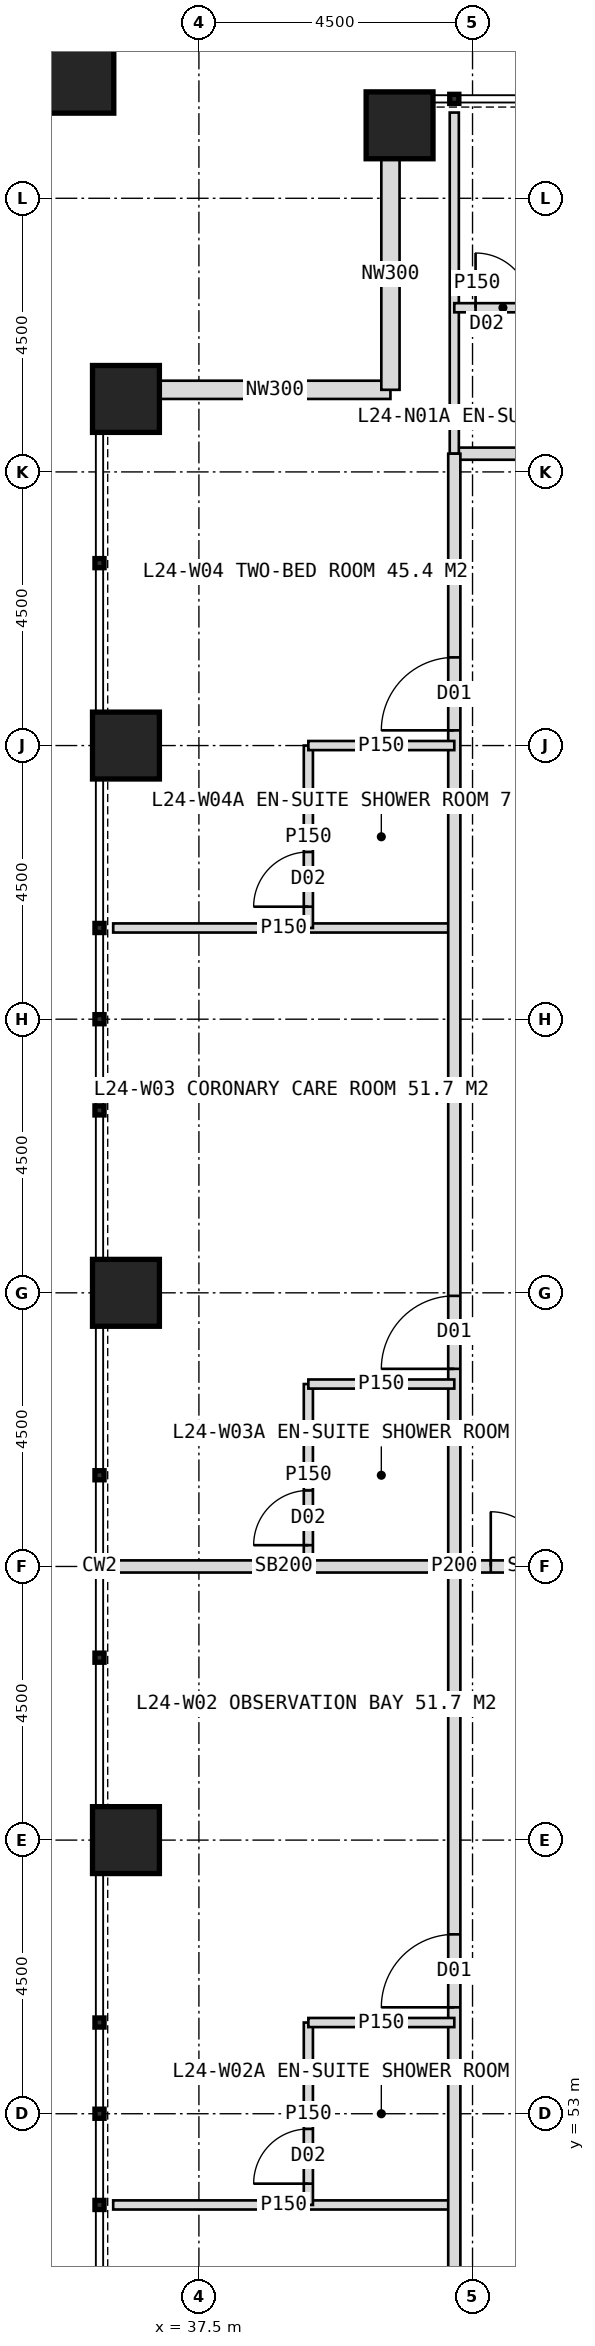
"""IFC4 building model, lengths in metres.
Left out: names, types, materials, properties, quantities, classifications, styles, units other than length and angle.
Written with IfcOpenShell. Run it as: python <this file> out.ifc"""

import sys

from ifc_helpers import new_model, si_unit, direction, frame, frame_2d, origin, origin_2d, place, context, subcontext, project, spatial, rectangle, hollow_rectangle, extrude, element, fill, save


model = new_model("IFC4")
c1 = context("Model", 3, precision=1e-05, world=origin(), true_north=direction((0.0, 1.0)))
c2 = subcontext(c1, "Body", "Model", "MODEL_VIEW")
j1 = project(units=[si_unit("LENGTHUNIT", "METRE"), si_unit("PLANEANGLEUNIT", "RADIAN")], contexts=[c1])
p1 = place(None, origin())
s1 = spatial("IfcSite", under=j1, at=p1, CompositionType="ELEMENT")
p2 = place(p1, origin())
s2 = spatial("IfcBuilding", under=s1, at=p2, CompositionType="ELEMENT")
p3 = place(p2, frame((0.0, 0.0, 104.0)))
s3 = spatial("IfcBuildingStorey", under=s2, at=p3, CompositionType="ELEMENT", Elevation=104.0)
for number, where, z_axis, x_axis in (
    (1, (40.8, 85.7, 0.0), (0.0, 0.0, 1.0), (1.0, 0.0, 0.0)),
    (2, (36.3, 57.5, 0.0), (0.0, 0.0, 1.0), (1.0, 0.0, 0.0)),
    (3, (36.3, 66.5, 0.0), (0.0, 0.0, 1.0), (1.0, 0.0, 0.0)),
    (4, (36.3, 75.5, 0.0), (0.0, 0.0, 1.0), (1.0, 0.0, 0.0)),
    (5, (36.3, 81.2, 0.0), (0.0, 0.0, 1.0), (1.0, 0.0, 0.0)),
):
    element("IfcColumn", number, at=place(p3, frame(where, z_axis=z_axis, x_axis=x_axis)), inside=s3, PredefinedType="COLUMN", context=c2, shape_type="SweptSolid", body=[
        extrude(hollow_rectangle(XDim=1.1, YDim=1.1, WallThickness=0.1, at=origin_2d()), origin(), (0.0, 0.0, 1.0), 4.0),
    ])
p4 = place(p3, frame((35.4, 86.6, 0.0), z_axis=(0.0, 0.0, 1.0), x_axis=(1.0, 0.0, 0.0)))
e6 = element("IfcColumn", 6, at=p4, inside=s3, PredefinedType="COLUMN", context=c2, shape_type="SweptSolid", body=[
    extrude(hollow_rectangle(XDim=1.4, YDim=1.4, WallThickness=0.08, at=origin_2d()), origin(), (0.0, 0.0, 1.0), 4.0),
])
for number, where, z_axis, x_axis in (
    (7, (36.85, 81.35, 0.0), (0.0, 0.0, 1.0), (1.0, 0.0, 0.0)),
    (8, (40.65, 81.35, 0.0), (0.0, 0.0, 1.0), (0.0, 1.0, 0.0)),
):
    element("IfcWall", number, at=place(p3, frame(where, z_axis=z_axis, x_axis=x_axis)), inside=s3, PredefinedType="ELEMENTEDWALL", context=c2, shape_type="SweptSolid", body=[
        extrude(rectangle(XDim=3.8, YDim=0.3, at=frame_2d((1.9, 0.0))), origin(), (0.0, 0.0, 1.0), 4.0),
    ])
p5 = place(p3, frame((41.7, 80.3, 0.0), z_axis=(0.0, 0.0, 1.0), x_axis=(1.0, 0.0, 0.0)))
e9 = element("IfcWall", 9, at=p5, inside=s3, PredefinedType="PARTITIONING", context=c2, shape_type="SweptSolid", body=[
    extrude(rectangle(XDim=36.6, YDim=0.2, at=frame_2d((18.3, 0.0))), origin(), (0.0, 0.0, 1.0), 3.75),
])
p6 = place(p5, frame((3.25, 0.0, 0.0)))
e10 = element("IfcOpeningElement", 10, at=p6, cuts=e9, PredefinedType="OPENING", context=c2, shape_type="SweptSolid", body=[
    extrude(rectangle(XDim=1.2, YDim=2.2, at=frame_2d((0.6, 1.1))), frame((0.0, 0.11, 0.0), z_axis=(0.0, -1.0, 0.0), x_axis=(1.0, 0.0, 0.0)), (0.0, 0.0, 1.0), 0.22),
])
p7 = place(p5, frame((11.05, 0.0, 0.0)))
e11 = element("IfcOpeningElement", 11, at=p7, cuts=e9, PredefinedType="OPENING", context=c2, shape_type="SweptSolid", body=[
    extrude(rectangle(XDim=1.2, YDim=2.2, at=frame_2d((0.6, 1.1))), frame((0.0, 0.11, 0.0), z_axis=(0.0, -1.0, 0.0), x_axis=(1.0, 0.0, 0.0)), (0.0, 0.0, 1.0), 0.22),
])
p8 = place(p5, frame((20.05, 0.0, 0.0)))
e12 = element("IfcOpeningElement", 12, at=p8, cuts=e9, PredefinedType="OPENING", context=c2, shape_type="SweptSolid", body=[
    extrude(rectangle(XDim=1.2, YDim=2.2, at=frame_2d((0.6, 1.1))), frame((0.0, 0.11, 0.0), z_axis=(0.0, -1.0, 0.0), x_axis=(1.0, 0.0, 0.0)), (0.0, 0.0, 1.0), 0.22),
])
p9 = place(p5, frame((28.45, 0.0, 0.0)))
e13 = element("IfcOpeningElement", 13, at=p9, cuts=e9, PredefinedType="OPENING", context=c2, shape_type="SweptSolid", body=[
    extrude(rectangle(XDim=1.2, YDim=2.2, at=frame_2d((0.6, 1.1))), frame((0.0, 0.11, 0.0), z_axis=(0.0, -1.0, 0.0), x_axis=(1.0, 0.0, 0.0)), (0.0, 0.0, 1.0), 0.22),
])
p10 = place(p3, frame((41.7, 80.3, 0.0), z_axis=(0.0, 0.0, 1.0), x_axis=(0.0, 1.0, 0.0)))
e14 = element("IfcWall", 14, at=p10, inside=s3, PredefinedType="PARTITIONING", context=c2, shape_type="SweptSolid", body=[
    extrude(rectangle(XDim=5.61, YDim=0.15, at=frame_2d((2.805, 0.0))), origin(), (0.0, 0.0, 1.0), 3.75),
])
p11 = place(p3, frame((41.7, 82.7, 0.0), z_axis=(0.0, 0.0, 1.0), x_axis=(1.0, 0.0, 0.0)))
e15 = element("IfcWall", 15, at=p11, inside=s3, PredefinedType="PARTITIONING", context=c2, shape_type="SweptSolid", body=[
    extrude(rectangle(XDim=3.0, YDim=0.15, at=frame_2d((1.5, 0.0))), origin(), (0.0, 0.0, 1.0), 3.75),
])
p12 = place(p11, frame((0.35, 0.0, 0.0)))
e16 = element("IfcOpeningElement", 16, at=p12, cuts=e15, PredefinedType="OPENING", context=c2, shape_type="SweptSolid", body=[
    extrude(rectangle(XDim=0.9, YDim=2.1, at=frame_2d((0.45, 1.05))), frame((0.0, 0.085, 0.0), z_axis=(0.0, -1.0, 0.0), x_axis=(1.0, 0.0, 0.0)), (0.0, 0.0, 1.0), 0.17),
])
p13 = place(p3, frame((41.7, 51.5, 0.0), z_axis=(0.0, 0.0, 1.0), x_axis=(-1.0, 0.0, 0.0)))
e17 = element("IfcWall", 17, at=p13, inside=s3, PredefinedType="PARTITIONING", context=c2, shape_type="SweptSolid", body=[
    extrude(rectangle(XDim=5.61, YDim=0.15, at=frame_2d((2.805, 0.0))), origin(), (0.0, 0.0, 1.0), 3.75),
])
p14 = place(p3, frame((41.7, 62.0, 0.0), z_axis=(0.0, 0.0, 1.0), x_axis=(-1.0, 0.0, 0.0)))
e18 = element("IfcWall", 18, at=p14, inside=s3, PredefinedType="SOLIDWALL", context=c2, shape_type="SweptSolid", body=[
    extrude(rectangle(XDim=5.61, YDim=0.2, at=frame_2d((2.805, 0.0))), origin(), (0.0, 0.0, 1.0), 2.95),
])
p15 = place(p3, frame((41.7, 72.5, 0.0), z_axis=(0.0, 0.0, 1.0), x_axis=(-1.0, 0.0, 0.0)))
e19 = element("IfcWall", 19, at=p15, inside=s3, PredefinedType="PARTITIONING", context=c2, shape_type="SweptSolid", body=[
    extrude(rectangle(XDim=5.61, YDim=0.15, at=frame_2d((2.805, 0.0))), origin(), (0.0, 0.0, 1.0), 3.75),
])
p16 = place(p3, frame((41.7, 43.7, 0.0), z_axis=(0.0, 0.0, 1.0), x_axis=(0.0, 1.0, 0.0)))
e20 = element("IfcWall", 20, at=p16, inside=s3, PredefinedType="PARTITIONING", context=c2, shape_type="SweptSolid", body=[
    extrude(rectangle(XDim=36.6, YDim=0.2, at=frame_2d((18.3, 0.0))), origin(), (0.0, 0.0, 1.0), 3.75),
])
p17 = place(p16, frame((3.25, 0.0, 0.0)))
e21 = element("IfcOpeningElement", 21, at=p17, cuts=e20, PredefinedType="OPENING", context=c2, shape_type="SweptSolid", body=[
    extrude(rectangle(XDim=1.2, YDim=2.2, at=frame_2d((0.6, 1.1))), frame((0.0, 0.11, 0.0), z_axis=(0.0, -1.0, 0.0), x_axis=(1.0, 0.0, 0.0)), (0.0, 0.0, 1.0), 0.22),
])
p18 = place(p16, frame((11.05, 0.0, 0.0)))
e22 = element("IfcOpeningElement", 22, at=p18, cuts=e20, PredefinedType="OPENING", context=c2, shape_type="SweptSolid", body=[
    extrude(rectangle(XDim=1.2, YDim=2.2, at=frame_2d((0.6, 1.1))), frame((0.0, 0.11, 0.0), z_axis=(0.0, -1.0, 0.0), x_axis=(1.0, 0.0, 0.0)), (0.0, 0.0, 1.0), 0.22),
])
p19 = place(p16, frame((21.55, 0.0, 0.0)))
e23 = element("IfcOpeningElement", 23, at=p19, cuts=e20, PredefinedType="OPENING", context=c2, shape_type="SweptSolid", body=[
    extrude(rectangle(XDim=1.2, YDim=2.2, at=frame_2d((0.6, 1.1))), frame((0.0, 0.11, 0.0), z_axis=(0.0, -1.0, 0.0), x_axis=(1.0, 0.0, 0.0)), (0.0, 0.0, 1.0), 0.22),
])
p20 = place(p16, frame((32.05, 0.0, 0.0)))
e24 = element("IfcOpeningElement", 24, at=p20, cuts=e20, PredefinedType="OPENING", context=c2, shape_type="SweptSolid", body=[
    extrude(rectangle(XDim=1.2, YDim=2.2, at=frame_2d((0.6, 1.1))), frame((0.0, 0.11, 0.0), z_axis=(0.0, -1.0, 0.0), x_axis=(1.0, 0.0, 0.0)), (0.0, 0.0, 1.0), 0.22),
])
p21 = place(p3, frame((39.3, 51.5, 0.0), z_axis=(0.0, 0.0, 1.0), x_axis=(0.0, 1.0, 0.0)))
e25 = element("IfcWall", 25, at=p21, inside=s3, PredefinedType="PARTITIONING", context=c2, shape_type="SweptSolid", body=[
    extrude(rectangle(XDim=3.0, YDim=0.15, at=frame_2d((1.5, 0.0))), origin(), (0.0, 0.0, 1.0), 3.75),
])
p22 = place(p21, frame((0.35, 0.0, 0.0)))
e26 = element("IfcOpeningElement", 26, at=p22, cuts=e25, PredefinedType="OPENING", context=c2, shape_type="SweptSolid", body=[
    extrude(rectangle(XDim=0.9, YDim=2.1, at=frame_2d((0.45, 1.05))), frame((0.0, 0.085, 0.0), z_axis=(0.0, -1.0, 0.0), x_axis=(1.0, 0.0, 0.0)), (0.0, 0.0, 1.0), 0.17),
])
p23 = place(p3, frame((41.7, 54.5, 0.0), z_axis=(0.0, 0.0, 1.0), x_axis=(-1.0, 0.0, 0.0)))
e27 = element("IfcWall", 27, at=p23, inside=s3, PredefinedType="PARTITIONING", context=c2, shape_type="SweptSolid", body=[
    extrude(rectangle(XDim=2.4, YDim=0.15, at=frame_2d((1.2, 0.0))), origin(), (0.0, 0.0, 1.0), 3.75),
])
p24 = place(p3, frame((39.3, 62.0, 0.0), z_axis=(0.0, 0.0, 1.0), x_axis=(0.0, 1.0, 0.0)))
e28 = element("IfcWall", 28, at=p24, inside=s3, PredefinedType="PARTITIONING", context=c2, shape_type="SweptSolid", body=[
    extrude(rectangle(XDim=3.0, YDim=0.15, at=frame_2d((1.5, 0.0))), origin(), (0.0, 0.0, 1.0), 3.75),
])
p25 = place(p24, frame((0.35, 0.0, 0.0)))
e29 = element("IfcOpeningElement", 29, at=p25, cuts=e28, PredefinedType="OPENING", context=c2, shape_type="SweptSolid", body=[
    extrude(rectangle(XDim=0.9, YDim=2.1, at=frame_2d((0.45, 1.05))), frame((0.0, 0.085, 0.0), z_axis=(0.0, -1.0, 0.0), x_axis=(1.0, 0.0, 0.0)), (0.0, 0.0, 1.0), 0.17),
])
p26 = place(p3, frame((41.7, 65.0, 0.0), z_axis=(0.0, 0.0, 1.0), x_axis=(-1.0, 0.0, 0.0)))
e30 = element("IfcWall", 30, at=p26, inside=s3, PredefinedType="PARTITIONING", context=c2, shape_type="SweptSolid", body=[
    extrude(rectangle(XDim=2.4, YDim=0.15, at=frame_2d((1.2, 0.0))), origin(), (0.0, 0.0, 1.0), 3.75),
])
p27 = place(p3, frame((39.3, 72.5, 0.0), z_axis=(0.0, 0.0, 1.0), x_axis=(0.0, 1.0, 0.0)))
e31 = element("IfcWall", 31, at=p27, inside=s3, PredefinedType="PARTITIONING", context=c2, shape_type="SweptSolid", body=[
    extrude(rectangle(XDim=3.0, YDim=0.15, at=frame_2d((1.5, 0.0))), origin(), (0.0, 0.0, 1.0), 3.75),
])
p28 = place(p27, frame((0.35, 0.0, 0.0)))
e32 = element("IfcOpeningElement", 32, at=p28, cuts=e31, PredefinedType="OPENING", context=c2, shape_type="SweptSolid", body=[
    extrude(rectangle(XDim=0.9, YDim=2.1, at=frame_2d((0.45, 1.05))), frame((0.0, 0.085, 0.0), z_axis=(0.0, -1.0, 0.0), x_axis=(1.0, 0.0, 0.0)), (0.0, 0.0, 1.0), 0.17),
])
p29 = place(p3, frame((41.7, 75.5, 0.0), z_axis=(0.0, 0.0, 1.0), x_axis=(-1.0, 0.0, 0.0)))
e33 = element("IfcWall", 33, at=p29, inside=s3, PredefinedType="PARTITIONING", context=c2, shape_type="SweptSolid", body=[
    extrude(rectangle(XDim=2.4, YDim=0.15, at=frame_2d((1.2, 0.0))), origin(), (0.0, 0.0, 1.0), 2.95),
])
p30 = place(p3, frame((44.4, 62.0, 0.0), z_axis=(0.0, 0.0, 1.0), x_axis=(-1.0, 0.0, 0.0)))
e34 = element("IfcWall", 34, at=p30, inside=s3, PredefinedType="SOLIDWALL", context=c2, shape_type="SweptSolid", body=[
    extrude(rectangle(XDim=2.7, YDim=0.2, at=frame_2d((1.35, 0.0))), origin(), (0.0, 0.0, 1.0), 2.95),
])
p31 = place(p30, frame((0.3, 0.0, 0.0)))
e35 = element("IfcOpeningElement", 35, at=p31, cuts=e34, PredefinedType="OPENING", context=c2, shape_type="SweptSolid", body=[
    extrude(rectangle(XDim=1.8, YDim=2.2, at=frame_2d((0.9, 1.1))), frame((0.0, 0.11, 0.0), z_axis=(0.0, -1.0, 0.0), x_axis=(1.0, 0.0, 0.0)), (0.0, 0.0, 1.0), 0.22),
])
p32 = place(p12, origin())
e36 = element("IfcDoor", 36, at=p32, inside=s3, OperationType="SINGLE_SWING_LEFT", PredefinedType="DOOR", context=c2, shape_type="SweptSolid", body=[
    extrude(rectangle(XDim=0.9, YDim=2.1, at=frame_2d((0.45, 1.05))), frame((0.0, 0.025, 0.0), z_axis=(0.0, -1.0, 0.0), x_axis=(1.0, 0.0, 0.0)), (0.0, 0.0, 1.0), 0.05),
])
fill(e16, e36)
p33 = place(p18, origin())
e37 = element("IfcDoor", 37, at=p33, inside=s3, OperationType="SINGLE_SWING_LEFT", PredefinedType="DOOR", context=c2, shape_type="SweptSolid", body=[
    extrude(rectangle(XDim=1.2, YDim=2.2, at=frame_2d((0.6, 1.1))), frame((0.0, 0.025, 0.0), z_axis=(0.0, -1.0, 0.0), x_axis=(1.0, 0.0, 0.0)), (0.0, 0.0, 1.0), 0.05),
])
fill(e22, e37)
p34 = place(p22, origin())
e38 = element("IfcDoor", 38, at=p34, inside=s3, OperationType="SINGLE_SWING_LEFT", PredefinedType="DOOR", context=c2, shape_type="SweptSolid", body=[
    extrude(rectangle(XDim=0.9, YDim=2.1, at=frame_2d((0.45, 1.05))), frame((0.0, 0.025, 0.0), z_axis=(0.0, -1.0, 0.0), x_axis=(1.0, 0.0, 0.0)), (0.0, 0.0, 1.0), 0.05),
])
fill(e26, e38)
p35 = place(p19, origin())
e39 = element("IfcDoor", 39, at=p35, inside=s3, OperationType="SINGLE_SWING_LEFT", PredefinedType="DOOR", context=c2, shape_type="SweptSolid", body=[
    extrude(rectangle(XDim=1.2, YDim=2.2, at=frame_2d((0.6, 1.1))), frame((0.0, 0.025, 0.0), z_axis=(0.0, -1.0, 0.0), x_axis=(1.0, 0.0, 0.0)), (0.0, 0.0, 1.0), 0.05),
])
fill(e23, e39)
p36 = place(p25, origin())
e40 = element("IfcDoor", 40, at=p36, inside=s3, OperationType="SINGLE_SWING_LEFT", PredefinedType="DOOR", context=c2, shape_type="SweptSolid", body=[
    extrude(rectangle(XDim=0.9, YDim=2.1, at=frame_2d((0.45, 1.05))), frame((0.0, 0.025, 0.0), z_axis=(0.0, -1.0, 0.0), x_axis=(1.0, 0.0, 0.0)), (0.0, 0.0, 1.0), 0.05),
])
fill(e29, e40)
p37 = place(p20, origin())
e41 = element("IfcDoor", 41, at=p37, inside=s3, OperationType="SINGLE_SWING_LEFT", PredefinedType="DOOR", context=c2, shape_type="SweptSolid", body=[
    extrude(rectangle(XDim=1.2, YDim=2.2, at=frame_2d((0.6, 1.1))), frame((0.0, 0.025, 0.0), z_axis=(0.0, -1.0, 0.0), x_axis=(1.0, 0.0, 0.0)), (0.0, 0.0, 1.0), 0.05),
])
fill(e24, e41)
p38 = place(p28, origin())
e42 = element("IfcDoor", 42, at=p38, inside=s3, OperationType="SINGLE_SWING_LEFT", PredefinedType="DOOR", context=c2, shape_type="SweptSolid", body=[
    extrude(rectangle(XDim=0.9, YDim=2.1, at=frame_2d((0.45, 1.05))), frame((0.0, 0.025, 0.0), z_axis=(0.0, -1.0, 0.0), x_axis=(1.0, 0.0, 0.0)), (0.0, 0.0, 1.0), 0.05),
])
fill(e32, e42)
p39 = place(p31, origin())
e43 = element("IfcDoor", 43, at=p39, inside=s3, OperationType="DOUBLE_DOOR_DOUBLE_SWING", PredefinedType="DOOR", context=c2, shape_type="SweptSolid", body=[
    extrude(rectangle(XDim=1.8, YDim=2.2, at=frame_2d((0.9, 1.1))), frame((0.0, 0.025, 0.0), z_axis=(0.0, -1.0, 0.0), x_axis=(1.0, 0.0, 0.0)), (0.0, 0.0, 1.0), 0.05),
])
fill(e35, e43)
save(model, sys.argv[1])
